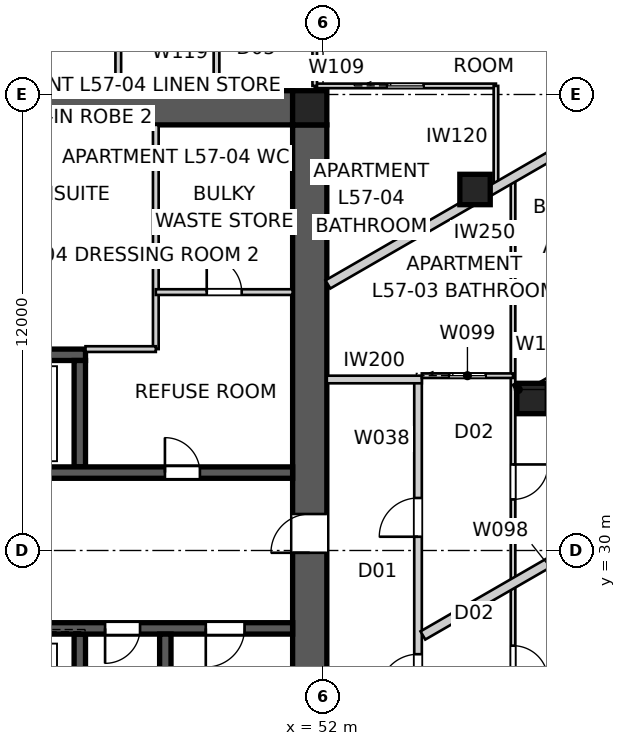
"""IFC4 building model, lengths in metres.
Left out: names, types, materials, properties, quantities, classifications, styles, units other than length and angle.
Written with IfcOpenShell. Run it as: python <this file> out.ifc"""

import sys

from ifc_helpers import new_model, si_unit, direction, frame, frame_2d, origin, origin_2d, place, context, subcontext, project, spatial, polyline, rectangle, outline, extrude, element, fill, save


model = new_model("IFC4")
c1 = context("Model", 3, precision=1e-05, world=origin(), true_north=direction((0.0, 1.0)))
c2 = subcontext(c1, "Body", "Model", "MODEL_VIEW")
j1 = project(units=[si_unit("LENGTHUNIT", "METRE"), si_unit("PLANEANGLEUNIT", "RADIAN")], contexts=[c1])
p1 = place(None, origin())
s1 = spatial("IfcSite", under=j1, at=p1, CompositionType="ELEMENT")
p2 = place(p1, origin())
s2 = spatial("IfcBuilding", under=s1, at=p2, CompositionType="ELEMENT")
p3 = place(p2, frame((0.0, 0.0, 208.2)))
s3 = spatial("IfcBuildingStorey", under=s2, at=p3, CompositionType="ELEMENT", Elevation=208.2)
p4 = place(p3, frame((28.8, 41.65, 0.0), z_axis=(0.0, 0.0, 1.0), x_axis=(1.0, 0.0, 0.0)))
e1 = element("IfcWall", 1, at=p4, inside=s3, PredefinedType="SHEAR", context=c2, shape_type="SweptSolid", body=[
    extrude(outline(polyline([(0.0, -0.45), (22.4, -0.45), (22.4, -0.025), (22.85, -0.025), (22.85, 0.025), (22.4, 0.025), (22.4, 0.45), (0.0, 0.45), (0.0, 0.025), (-0.45, 0.025), (-0.45, -0.025), (0.0, -0.025), (0.0, -0.45)])), origin(), (0.0, 0.0, 1.0), 3.4),
])
p5 = place(p3, frame((51.65, 18.8, 0.0), z_axis=(0.0, 0.0, 1.0), x_axis=(0.0, 1.0, 0.0)))
e2 = element("IfcWall", 2, at=p5, inside=s3, PredefinedType="SHEAR", context=c2, shape_type="SweptSolid", body=[
    extrude(outline(polyline([(0.0, -0.45), (22.4, -0.45), (22.4, -0.025), (22.85, -0.025), (22.85, 0.025), (22.4, 0.025), (22.4, 0.45), (0.0, 0.45), (0.0, 0.025), (-0.45, 0.025), (-0.45, -0.025), (0.0, -0.025), (0.0, -0.45)])), origin(), (0.0, 0.0, 1.0), 3.4),
])
p6 = place(p5, frame((11.14, 0.0, 0.0)))
e3 = element("IfcOpeningElement", 3, at=p6, cuts=e2, PredefinedType="OPENING", context=c2, shape_type="SweptSolid", body=[
    extrude(rectangle(XDim=1.02, YDim=2.4, at=frame_2d((0.51, 1.2))), frame((0.0, 0.46, 0.0), z_axis=(0.0, -1.0, 0.0), x_axis=(1.0, 0.0, 0.0)), (0.0, 0.0, 1.0), 0.92),
])
p7 = place(p3, frame((28.8, 32.05, 0.0), z_axis=(0.0, 0.0, 1.0), x_axis=(1.0, 0.0, 0.0)))
e4 = element("IfcWall", 4, at=p7, inside=s3, PredefinedType="SHEAR", context=c2, shape_type="SweptSolid", body=[
    extrude(rectangle(XDim=22.4, YDim=0.3, at=frame_2d((11.2, 0.0))), origin(), (0.0, 0.0, 1.0), 3.4),
])
p8 = place(p7, frame((19.04, 0.0, 0.0)))
e5 = element("IfcOpeningElement", 5, at=p8, cuts=e4, PredefinedType="OPENING", context=c2, shape_type="SweptSolid", body=[
    extrude(rectangle(XDim=0.92, YDim=2.1, at=frame_2d((0.46, 1.05))), frame((0.0, 0.16, 0.0), z_axis=(0.0, -1.0, 0.0), x_axis=(1.0, 0.0, 0.0)), (0.0, 0.0, 1.0), 0.32),
])
p9 = place(p7, frame((1.265, 0.0, 0.0)))
e6 = element("IfcOpeningElement", 6, at=p9, cuts=e4, PredefinedType="OPENING", context=c2, shape_type="SweptSolid", body=[
    extrude(rectangle(XDim=1.02, YDim=2.1, at=frame_2d((0.51, 1.05))), frame((0.0, 0.16, 0.0), z_axis=(0.0, -1.0, 0.0), x_axis=(1.0, 0.0, 0.0)), (0.0, 0.0, 1.0), 0.32),
])
p10 = place(p7, frame((4.015, 0.0, 0.0)))
e7 = element("IfcOpeningElement", 7, at=p10, cuts=e4, PredefinedType="OPENING", context=c2, shape_type="SweptSolid", body=[
    extrude(rectangle(XDim=0.92, YDim=2.1, at=frame_2d((0.46, 1.05))), frame((0.0, 0.16, 0.0), z_axis=(0.0, -1.0, 0.0), x_axis=(1.0, 0.0, 0.0)), (0.0, 0.0, 1.0), 0.32),
])
p11 = place(p7, frame((6.565, 0.0, 0.0)))
e8 = element("IfcOpeningElement", 8, at=p11, cuts=e4, PredefinedType="OPENING", context=c2, shape_type="SweptSolid", body=[
    extrude(rectangle(XDim=0.92, YDim=2.1, at=frame_2d((0.46, 1.05))), frame((0.0, 0.16, 0.0), z_axis=(0.0, -1.0, 0.0), x_axis=(1.0, 0.0, 0.0)), (0.0, 0.0, 1.0), 0.32),
])
p12 = place(p7, frame((8.89, 0.0, 0.0)))
e9 = element("IfcOpeningElement", 9, at=p12, cuts=e4, PredefinedType="OPENING", context=c2, shape_type="SweptSolid", body=[
    extrude(rectangle(XDim=0.92, YDim=2.1, at=frame_2d((0.46, 1.05))), frame((0.0, 0.16, 0.0), z_axis=(0.0, -1.0, 0.0), x_axis=(1.0, 0.0, 0.0)), (0.0, 0.0, 1.0), 0.32),
])
p13 = place(p7, frame((12.05, 0.0, 0.0)))
e10 = element("IfcOpeningElement", 10, at=p13, cuts=e4, PredefinedType="OPENING", context=c2, shape_type="SweptSolid", body=[
    extrude(rectangle(XDim=1.1, YDim=2.1, at=frame_2d((0.55, 1.05))), frame((0.0, 0.16, 0.0), z_axis=(0.0, -1.0, 0.0), x_axis=(1.0, 0.0, 0.0)), (0.0, 0.0, 1.0), 0.32),
])
p14 = place(p7, frame((14.85, 0.0, 0.0)))
e11 = element("IfcOpeningElement", 11, at=p14, cuts=e4, PredefinedType="OPENING", context=c2, shape_type="SweptSolid", body=[
    extrude(rectangle(XDim=1.1, YDim=2.1, at=frame_2d((0.55, 1.05))), frame((0.0, 0.16, 0.0), z_axis=(0.0, -1.0, 0.0), x_axis=(1.0, 0.0, 0.0)), (0.0, 0.0, 1.0), 0.32),
])
p15 = place(p3, frame((51.2, 27.95, 0.0), z_axis=(0.0, 0.0, 1.0), x_axis=(-1.0, 0.0, 0.0)))
e12 = element("IfcWall", 12, at=p15, inside=s3, PredefinedType="SHEAR", context=c2, shape_type="SweptSolid", body=[
    extrude(rectangle(XDim=22.4, YDim=0.3, at=frame_2d((11.2, 0.0))), origin(), (0.0, 0.0, 1.0), 3.4),
])
p16 = place(p15, frame((19.04, 0.0, 0.0)))
e13 = element("IfcOpeningElement", 13, at=p16, cuts=e12, PredefinedType="OPENING", context=c2, shape_type="SweptSolid", body=[
    extrude(rectangle(XDim=0.92, YDim=2.1, at=frame_2d((0.46, 1.05))), frame((0.0, 0.16, 0.0), z_axis=(0.0, -1.0, 0.0), x_axis=(1.0, 0.0, 0.0)), (0.0, 0.0, 1.0), 0.32),
])
p17 = place(p15, frame((1.265, 0.0, 0.0)))
e14 = element("IfcOpeningElement", 14, at=p17, cuts=e12, PredefinedType="OPENING", context=c2, shape_type="SweptSolid", body=[
    extrude(rectangle(XDim=1.02, YDim=2.1, at=frame_2d((0.51, 1.05))), frame((0.0, 0.16, 0.0), z_axis=(0.0, -1.0, 0.0), x_axis=(1.0, 0.0, 0.0)), (0.0, 0.0, 1.0), 0.32),
])
p18 = place(p15, frame((4.015, 0.0, 0.0)))
e15 = element("IfcOpeningElement", 15, at=p18, cuts=e12, PredefinedType="OPENING", context=c2, shape_type="SweptSolid", body=[
    extrude(rectangle(XDim=0.92, YDim=2.1, at=frame_2d((0.46, 1.05))), frame((0.0, 0.16, 0.0), z_axis=(0.0, -1.0, 0.0), x_axis=(1.0, 0.0, 0.0)), (0.0, 0.0, 1.0), 0.32),
])
p19 = place(p15, frame((6.45, 0.0, 0.0)))
e16 = element("IfcOpeningElement", 16, at=p19, cuts=e12, PredefinedType="OPENING", context=c2, shape_type="SweptSolid", body=[
    extrude(rectangle(XDim=1.1, YDim=2.1, at=frame_2d((0.55, 1.05))), frame((0.0, 0.16, 0.0), z_axis=(0.0, -1.0, 0.0), x_axis=(1.0, 0.0, 0.0)), (0.0, 0.0, 1.0), 0.32),
])
p20 = place(p15, frame((9.25, 0.0, 0.0)))
e17 = element("IfcOpeningElement", 17, at=p20, cuts=e12, PredefinedType="OPENING", context=c2, shape_type="SweptSolid", body=[
    extrude(rectangle(XDim=1.1, YDim=2.1, at=frame_2d((0.55, 1.05))), frame((0.0, 0.16, 0.0), z_axis=(0.0, -1.0, 0.0), x_axis=(1.0, 0.0, 0.0)), (0.0, 0.0, 1.0), 0.32),
])
p21 = place(p15, frame((12.05, 0.0, 0.0)))
e18 = element("IfcOpeningElement", 18, at=p21, cuts=e12, PredefinedType="OPENING", context=c2, shape_type="SweptSolid", body=[
    extrude(rectangle(XDim=1.1, YDim=2.1, at=frame_2d((0.55, 1.05))), frame((0.0, 0.16, 0.0), z_axis=(0.0, -1.0, 0.0), x_axis=(1.0, 0.0, 0.0)), (0.0, 0.0, 1.0), 0.32),
])
p22 = place(p15, frame((14.85, 0.0, 0.0)))
e19 = element("IfcOpeningElement", 19, at=p22, cuts=e12, PredefinedType="OPENING", context=c2, shape_type="SweptSolid", body=[
    extrude(rectangle(XDim=1.1, YDim=2.1, at=frame_2d((0.55, 1.05))), frame((0.0, 0.16, 0.0), z_axis=(0.0, -1.0, 0.0), x_axis=(1.0, 0.0, 0.0)), (0.0, 0.0, 1.0), 0.32),
])
p23 = place(p3, frame((34.25, 35.15, 0.0), z_axis=(0.0, 0.0, 1.0), x_axis=(1.0, 0.0, 0.0)))
e20 = element("IfcWall", 20, at=p23, inside=s3, PredefinedType="SHEAR", context=c2, shape_type="SweptSolid", body=[
    extrude(rectangle(XDim=11.5, YDim=0.3, at=frame_2d((5.75, 0.0))), origin(), (0.0, 0.0, 1.0), 3.4),
])
for number, where, z_axis, x_axis in (
    (21, (45.6, 27.8, 0.0), (0.0, 0.0, 1.0), (0.0, -1.0, 0.0)),
    (22, (45.6, 32.2, 0.0), (0.0, 0.0, 1.0), (0.0, 1.0, 0.0)),
):
    element("IfcWall", number, at=place(p3, frame(where, z_axis=z_axis, x_axis=x_axis)), inside=s3, PredefinedType="SHEAR", context=c2, shape_type="SweptSolid", body=[
        extrude(rectangle(XDim=2.8, YDim=0.3, at=frame_2d((1.4, 0.0))), origin(), (0.0, 0.0, 1.0), 3.4),
    ])
p24 = place(p3, frame((47.85, 27.8, 0.0), z_axis=(0.0, 0.0, 1.0), x_axis=(0.0, -1.0, 0.0)))
e23 = element("IfcWall", 23, at=p24, inside=s3, PredefinedType="SHEAR", context=c2, shape_type="SweptSolid", body=[
    extrude(rectangle(XDim=7.7, YDim=0.3, at=frame_2d((3.85, 0.0))), origin(), (0.0, 0.0, 1.0), 3.4),
])
p25 = place(p3, frame((51.65, 41.65, 0.0), z_axis=(0.0, 0.0, 1.0), x_axis=(1.0, 0.0, 0.0)))
e24 = element("IfcColumn", 24, at=p25, inside=s3, PredefinedType="COLUMN", context=c2, shape_type="SweptSolid", body=[
    extrude(rectangle(XDim=0.9, YDim=0.9, at=origin_2d()), origin(), (0.0, 0.0, 1.0), 3.4),
])
for number, where, z_axis, x_axis in (
    (25, (57.5, 34.0, 0.0), (0.0, 0.0, 1.0), (1.0, 0.0, 0.0)),
    (26, (56.0, 39.5, 0.0), (0.0, 0.0, 1.0), (1.0, 0.0, 0.0)),
):
    element("IfcColumn", number, at=place(p3, frame(where, z_axis=z_axis, x_axis=x_axis)), inside=s3, PredefinedType="COLUMN", context=c2, shape_type="SweptSolid", body=[
        extrude(rectangle(XDim=0.8, YDim=0.8, at=origin_2d()), origin(), (0.0, 0.0, 1.0), 3.4),
    ])
p26 = place(p3, frame((54.5, 25.5, 0.0), z_axis=(0.0, 0.0, 1.0), x_axis=(0.0, 1.0, 0.0)))
e27 = element("IfcWall", 27, at=p26, inside=s3, PredefinedType="PARTITIONING", context=c2, shape_type="SweptSolid", body=[
    extrude(rectangle(XDim=9.0, YDim=0.2, at=frame_2d((4.5, 0.0))), origin(), (0.0, 0.0, 1.0), 3.25),
])
p27 = place(p26, frame((4.862, 0.0, 0.0)))
e28 = element("IfcOpeningElement", 28, at=p27, cuts=e27, PredefinedType="OPENING", context=c2, shape_type="SweptSolid", body=[
    extrude(rectangle(XDim=1.02, YDim=2.34, at=frame_2d((0.51, 1.17))), frame((0.0, 0.11, 0.0), z_axis=(0.0, -1.0, 0.0), x_axis=(1.0, 0.0, 0.0)), (0.0, 0.0, 1.0), 0.22),
])
p28 = place(p26, frame((0.751, 0.0, 0.0)))
e29 = element("IfcOpeningElement", 29, at=p28, cuts=e27, PredefinedType="OPENING", context=c2, shape_type="SweptSolid", body=[
    extrude(rectangle(XDim=1.02, YDim=2.34, at=frame_2d((0.51, 1.17))), frame((0.0, 0.11, 0.0), z_axis=(0.0, -1.0, 0.0), x_axis=(1.0, 0.0, 0.0)), (0.0, 0.0, 1.0), 0.22),
])
p29 = place(p3, frame((52.1, 34.5, 0.0), z_axis=(0.0, 0.0, 1.0), x_axis=(1.0, 0.0, 0.0)))
e30 = element("IfcWall", 30, at=p29, inside=s3, PredefinedType="PARTITIONING", context=c2, shape_type="SweptSolid", body=[
    extrude(rectangle(XDim=2.5, YDim=0.2, at=frame_2d((1.25, 0.0))), origin(), (0.0, 0.0, 1.0), 3.25),
])
p30 = place(p3, frame((59.486, 41.25, 0.0), z_axis=(0.0, 0.0, 1.0), x_axis=(-0.866020489494, -0.500008511703, 0.0)))
e31 = element("IfcWall", 31, at=p30, inside=s3, PredefinedType="PARTITIONING", context=c2, shape_type="SweptSolid", body=[
    extrude(rectangle(XDim=8.496, YDim=0.25, at=frame_2d((4.248, 0.0))), origin(), (0.0, 0.0, 1.0), 3.25),
])
p31 = place(p3, frame((64.111, 33.239, 0.0), z_axis=(0.0, 0.0, 1.0), x_axis=(-0.866024069551, -0.500002310952, 0.0)))
e32 = element("IfcWall", 32, at=p31, inside=s3, PredefinedType="PARTITIONING", context=c2, shape_type="SweptSolid", body=[
    extrude(rectangle(XDim=10.95, YDim=0.25, at=frame_2d((5.475, 0.0))), origin(), (0.0, 0.0, 1.0), 3.25),
])
p32 = place(p3, frame((47.6, 41.2, 0.0), z_axis=(0.0, 0.0, 1.0), x_axis=(0.0, -1.0, 0.0)))
e33 = element("IfcWall", 33, at=p32, inside=s3, PredefinedType="SOLIDWALL", context=c2, shape_type="SweptSolid", body=[
    extrude(rectangle(XDim=5.9, YDim=0.15, at=frame_2d((2.95, 0.0))), origin(), (0.0, 0.0, 1.0), 3.25),
])
p33 = place(p3, frame((47.6, 35.3, 0.0), z_axis=(0.0, 0.0, 1.0), x_axis=(-1.0, 0.0, 0.0)))
e34 = element("IfcWall", 34, at=p33, inside=s3, PredefinedType="SOLIDWALL", context=c2, shape_type="SweptSolid", body=[
    extrude(rectangle(XDim=1.85, YDim=0.15, at=frame_2d((0.925, 0.0))), origin(), (0.0, 0.0, 1.0), 3.25),
])
p34 = place(p3, frame((47.6, 36.8, 0.0), z_axis=(0.0, 0.0, 1.0), x_axis=(1.0, 0.0, 0.0)))
e35 = element("IfcWall", 35, at=p34, inside=s3, PredefinedType="SOLIDWALL", context=c2, shape_type="SweptSolid", body=[
    extrude(rectangle(XDim=3.6, YDim=0.15, at=frame_2d((1.8, 0.0))), origin(), (0.0, 0.0, 1.0), 3.25),
])
p35 = place(p34, frame((1.34, 0.0, 0.0)))
e36 = element("IfcOpeningElement", 36, at=p35, cuts=e35, PredefinedType="OPENING", context=c2, shape_type="SweptSolid", body=[
    extrude(rectangle(XDim=0.92, YDim=2.1, at=frame_2d((0.46, 1.05))), frame((0.0, 0.085, 0.0), z_axis=(0.0, -1.0, 0.0), x_axis=(1.0, 0.0, 0.0)), (0.0, 0.0, 1.0), 0.17),
])
p36 = place(p3, frame((57.0, 39.815, 0.0), z_axis=(0.0, 0.0, 1.0), x_axis=(0.0, -1.0, 0.0)))
e37 = element("IfcWall", 37, at=p36, inside=s3, PredefinedType="PARTITIONING", context=c2, shape_type="SweptSolid", body=[
    extrude(rectangle(XDim=21.919, YDim=0.12, at=frame_2d((10.959, 0.0))), origin(), (0.0, 0.0, 1.0), 2.55),
])
p37 = place(p36, frame((7.551, 0.0, 0.0)))
e38 = element("IfcOpeningElement", 38, at=p37, cuts=e37, PredefinedType="OPENING", context=c2, shape_type="SweptSolid", body=[
    extrude(rectangle(XDim=0.92, YDim=2.34, at=frame_2d((0.46, 1.17))), frame((0.0, 0.07, 0.0), z_axis=(0.0, -1.0, 0.0), x_axis=(1.0, 0.0, 0.0)), (0.0, 0.0, 1.0), 0.14),
])
p38 = place(p36, frame((12.32, 0.0, 0.0)))
e39 = element("IfcOpeningElement", 39, at=p38, cuts=e37, PredefinedType="OPENING", context=c2, shape_type="SweptSolid", body=[
    extrude(rectangle(XDim=0.92, YDim=2.34, at=frame_2d((0.46, 1.17))), frame((0.0, 0.07, 0.0), z_axis=(0.0, -1.0, 0.0), x_axis=(1.0, 0.0, 0.0)), (0.0, 0.0, 1.0), 0.14),
])
p39 = place(p3, frame((54.6, 34.6, 0.0), z_axis=(0.0, 0.0, 1.0), x_axis=(1.0, 0.0, 0.0)))
e40 = element("IfcWall", 40, at=p39, inside=s3, PredefinedType="PARTITIONING", context=c2, shape_type="SweptSolid", body=[
    extrude(rectangle(XDim=2.4, YDim=0.12, at=frame_2d((1.2, 0.0))), origin(), (0.0, 0.0, 1.0), 3.25),
])
p40 = place(p39, frame((0.72, 0.0, 0.0)))
e41 = element("IfcOpeningElement", 41, at=p40, cuts=e40, PredefinedType="OPENING", context=c2, shape_type="SweptSolid", body=[
    extrude(rectangle(XDim=0.96, YDim=2.1, at=frame_2d((0.48, 1.05))), frame((0.0, 0.07, 0.0), z_axis=(0.0, -1.0, 0.0), x_axis=(1.0, 0.0, 0.0)), (0.0, 0.0, 1.0), 0.14),
])
p41 = place(p3, frame((57.05, 34.388, 0.0), z_axis=(0.0, 0.0, 1.0), x_axis=(0.49996389635, -0.866046247233, 0.0)))
e42 = element("IfcWall", 42, at=p41, inside=s3, PredefinedType="PARTITIONING", context=c2, shape_type="SweptSolid", body=[
    extrude(rectangle(XDim=0.35, YDim=0.12, at=frame_2d((0.175, 0.0))), origin(), (0.0, 0.0, 1.0), 3.25),
])
p42 = place(p3, frame((57.225, 34.085, 0.0), z_axis=(0.0, 0.0, 1.0), x_axis=(0.866019274569, 0.500010615962, 0.0)))
e43 = element("IfcWall", 43, at=p42, inside=s3, PredefinedType="PARTITIONING", context=c2, shape_type="SweptSolid", body=[
    extrude(rectangle(XDim=5.5, YDim=0.12, at=frame_2d((2.75, 0.0))), origin(), (0.0, 0.0, 1.0), 3.25),
])
p43 = place(p42, frame((2.31, 0.0, 0.0)))
e44 = element("IfcOpeningElement", 44, at=p43, cuts=e43, PredefinedType="OPENING", context=c2, shape_type="SweptSolid", body=[
    extrude(rectangle(XDim=0.92, YDim=2.34, at=frame_2d((0.46, 1.17))), frame((0.0, 0.07, 0.0), z_axis=(0.0, -1.0, 0.0), x_axis=(1.0, 0.0, 0.0)), (0.0, 0.0, 1.0), 0.14),
])
p44 = place(p3, frame((51.782, 42.226, 0.0), z_axis=(0.0, 0.0, 1.0), x_axis=(1.0, 0.0, 0.0)))
e45 = element("IfcWall", 45, at=p44, inside=s3, PredefinedType="PARTITIONING", context=c2, shape_type="SweptSolid", body=[
    extrude(rectangle(XDim=4.768, YDim=0.12, at=frame_2d((2.384, 0.0))), origin(), (0.0, 0.0, 1.0), 3.25),
])
p45 = place(p44, frame((1.904, 0.0, 0.0)))
e46 = element("IfcOpeningElement", 46, at=p45, cuts=e45, PredefinedType="OPENING", context=c2, shape_type="SweptSolid", body=[
    extrude(rectangle(XDim=0.96, YDim=2.1, at=frame_2d((0.48, 1.05))), frame((0.0, 0.07, 0.0), z_axis=(0.0, -1.0, 0.0), x_axis=(1.0, 0.0, 0.0)), (0.0, 0.0, 1.0), 0.14),
])
p46 = place(p3, frame((56.55, 42.226, 0.0), z_axis=(0.0, 0.0, 1.0), x_axis=(0.0, -1.0, 0.0)))
e47 = element("IfcWall", 47, at=p46, inside=s3, PredefinedType="PARTITIONING", context=c2, shape_type="SweptSolid", body=[
    extrude(rectangle(XDim=2.671, YDim=0.12, at=frame_2d((1.335, 0.0))), origin(), (0.0, 0.0, 1.0), 3.25),
])
p47 = place(p3, frame((51.782, 42.226, 0.0), z_axis=(0.0, 0.0, 1.0), x_axis=(0.0, 1.0, 0.0)))
e48 = element("IfcWall", 48, at=p47, inside=s3, PredefinedType="PARTITIONING", context=c2, shape_type="SweptSolid", body=[
    extrude(rectangle(XDim=4.774, YDim=0.12, at=frame_2d((2.387, 0.0))), origin(), (0.0, 0.0, 1.0), 3.25),
])
p48 = place(p47, frame((1.907, 0.0, 0.0)))
e49 = element("IfcOpeningElement", 49, at=p48, cuts=e48, PredefinedType="OPENING", context=c2, shape_type="SweptSolid", body=[
    extrude(rectangle(XDim=0.96, YDim=2.1, at=frame_2d((0.48, 1.05))), frame((0.0, 0.07, 0.0), z_axis=(0.0, -1.0, 0.0), x_axis=(1.0, 0.0, 0.0)), (0.0, 0.0, 1.0), 0.14),
])
p49 = place(p3, frame((46.612, 47.0, 0.0), z_axis=(0.0, 0.0, 1.0), x_axis=(0.0, -1.0, 0.0)))
e50 = element("IfcWall", 50, at=p49, inside=s3, PredefinedType="SOLIDWALL", context=c2, shape_type="SweptSolid", body=[
    extrude(rectangle(XDim=4.9, YDim=0.15, at=frame_2d((2.45, 0.0))), origin(), (0.0, 0.0, 1.0), 3.25),
])
p50 = place(p49, frame((1.99, 0.0, 0.0)))
e51 = element("IfcOpeningElement", 51, at=p50, cuts=e50, PredefinedType="OPENING", context=c2, shape_type="SweptSolid", body=[
    extrude(rectangle(XDim=0.92, YDim=2.34, at=frame_2d((0.46, 1.17))), frame((0.0, 0.085, 0.0), z_axis=(0.0, -1.0, 0.0), x_axis=(1.0, 0.0, 0.0)), (0.0, 0.0, 1.0), 0.17),
])
p51 = place(p3, frame((49.197, 42.1, 0.0), z_axis=(0.0, 0.0, 1.0), x_axis=(0.0, 1.0, 0.0)))
e52 = element("IfcWall", 52, at=p51, inside=s3, PredefinedType="SOLIDWALL", context=c2, shape_type="SweptSolid", body=[
    extrude(rectangle(XDim=4.9, YDim=0.15, at=frame_2d((2.45, 0.0))), origin(), (0.0, 0.0, 1.0), 3.25),
])
p52 = place(p51, frame((1.97, 0.0, 0.0)))
e53 = element("IfcOpeningElement", 53, at=p52, cuts=e52, PredefinedType="OPENING", context=c2, shape_type="SweptSolid", body=[
    extrude(rectangle(XDim=0.96, YDim=2.1, at=frame_2d((0.48, 1.05))), frame((0.0, 0.085, 0.0), z_axis=(0.0, -1.0, 0.0), x_axis=(1.0, 0.0, 0.0)), (0.0, 0.0, 1.0), 0.17),
])
p53 = place(p8, origin())
e54 = element("IfcDoor", 54, at=p53, inside=s3, OperationType="SINGLE_SWING_LEFT", PredefinedType="DOOR", context=c2, shape_type="SweptSolid", body=[
    extrude(rectangle(XDim=0.92, YDim=2.1, at=frame_2d((0.46, 1.05))), frame((0.0, 0.025, 0.0), z_axis=(0.0, -1.0, 0.0), x_axis=(1.0, 0.0, 0.0)), (0.0, 0.0, 1.0), 0.05),
])
fill(e5, e54)
p54 = place(p17, origin())
e55 = element("IfcDoor", 55, at=p54, inside=s3, OperationType="SINGLE_SWING_RIGHT", PredefinedType="DOOR", context=c2, shape_type="SweptSolid", body=[
    extrude(rectangle(XDim=1.02, YDim=2.1, at=frame_2d((0.51, 1.05))), frame((0.0, 0.025, 0.0), z_axis=(0.0, -1.0, 0.0), x_axis=(1.0, 0.0, 0.0)), (0.0, 0.0, 1.0), 0.05),
])
fill(e14, e55)
p55 = place(p18, origin())
e56 = element("IfcDoor", 56, at=p55, inside=s3, OperationType="SINGLE_SWING_RIGHT", PredefinedType="DOOR", context=c2, shape_type="SweptSolid", body=[
    extrude(rectangle(XDim=0.92, YDim=2.1, at=frame_2d((0.46, 1.05))), frame((0.0, 0.025, 0.0), z_axis=(0.0, -1.0, 0.0), x_axis=(1.0, 0.0, 0.0)), (0.0, 0.0, 1.0), 0.05),
])
fill(e15, e56)
p56 = place(p27, origin())
e57 = element("IfcDoor", 57, at=p56, inside=s3, OperationType="SINGLE_SWING_LEFT", PredefinedType="DOOR", context=c2, shape_type="SweptSolid", body=[
    extrude(rectangle(XDim=1.02, YDim=2.34, at=frame_2d((0.51, 1.17))), frame((0.0, 0.025, 0.0), z_axis=(0.0, -1.0, 0.0), x_axis=(1.0, 0.0, 0.0)), (0.0, 0.0, 1.0), 0.05),
])
fill(e28, e57)
p57 = place(p28, origin())
e58 = element("IfcDoor", 58, at=p57, inside=s3, OperationType="SINGLE_SWING_LEFT", PredefinedType="DOOR", context=c2, shape_type="SweptSolid", body=[
    extrude(rectangle(XDim=1.02, YDim=2.34, at=frame_2d((0.51, 1.17))), frame((0.0, 0.025, 0.0), z_axis=(0.0, -1.0, 0.0), x_axis=(1.0, 0.0, 0.0)), (0.0, 0.0, 1.0), 0.05),
])
fill(e29, e58)
p58 = place(p35, origin())
e59 = element("IfcDoor", 59, at=p58, inside=s3, OperationType="SINGLE_SWING_LEFT", PredefinedType="DOOR", context=c2, shape_type="SweptSolid", body=[
    extrude(rectangle(XDim=0.92, YDim=2.1, at=frame_2d((0.46, 1.05))), frame((0.0, 0.025, 0.0), z_axis=(0.0, -1.0, 0.0), x_axis=(1.0, 0.0, 0.0)), (0.0, 0.0, 1.0), 0.05),
])
fill(e36, e59)
p59 = place(p37, origin())
e60 = element("IfcDoor", 60, at=p59, inside=s3, OperationType="SINGLE_SWING_LEFT", PredefinedType="DOOR", context=c2, shape_type="SweptSolid", body=[
    extrude(rectangle(XDim=0.92, YDim=2.34, at=frame_2d((0.46, 1.17))), frame((0.0, 0.025, 0.0), z_axis=(0.0, -1.0, 0.0), x_axis=(1.0, 0.0, 0.0)), (0.0, 0.0, 1.0), 0.05),
])
fill(e38, e60)
p60 = place(p40, origin())
e61 = element("IfcDoor", 61, at=p60, inside=s3, OperationType="SLIDING_TO_LEFT", PredefinedType="DOOR", context=c2, shape_type="SweptSolid", body=[
    extrude(rectangle(XDim=0.96, YDim=2.1, at=frame_2d((0.48, 1.05))), frame((0.0, 0.025, 0.0), z_axis=(0.0, -1.0, 0.0), x_axis=(1.0, 0.0, 0.0)), (0.0, 0.0, 1.0), 0.05),
])
fill(e41, e61)
p61 = place(p38, origin())
e62 = element("IfcDoor", 62, at=p61, inside=s3, OperationType="SINGLE_SWING_RIGHT", PredefinedType="DOOR", context=c2, shape_type="SweptSolid", body=[
    extrude(rectangle(XDim=0.92, YDim=2.34, at=frame_2d((0.46, 1.17))), frame((0.0, 0.025, 0.0), z_axis=(0.0, -1.0, 0.0), x_axis=(1.0, 0.0, 0.0)), (0.0, 0.0, 1.0), 0.05),
])
fill(e39, e62)
p62 = place(p45, origin())
e63 = element("IfcDoor", 63, at=p62, inside=s3, OperationType="SLIDING_TO_LEFT", PredefinedType="DOOR", context=c2, shape_type="SweptSolid", body=[
    extrude(rectangle(XDim=0.96, YDim=2.1, at=frame_2d((0.48, 1.05))), frame((0.0, 0.025, 0.0), z_axis=(0.0, -1.0, 0.0), x_axis=(1.0, 0.0, 0.0)), (0.0, 0.0, 1.0), 0.05),
])
fill(e46, e63)
p63 = place(p6, origin())
e64 = element("IfcDoor", 64, at=p63, inside=s3, OperationType="SINGLE_SWING_LEFT", PredefinedType="DOOR", context=c2, shape_type="SweptSolid", body=[
    extrude(rectangle(XDim=1.02, YDim=2.4, at=frame_2d((0.51, 1.2))), frame((0.0, 0.025, 0.0), z_axis=(0.0, -1.0, 0.0), x_axis=(1.0, 0.0, 0.0)), (0.0, 0.0, 1.0), 0.05),
])
fill(e3, e64)
save(model, sys.argv[1])
